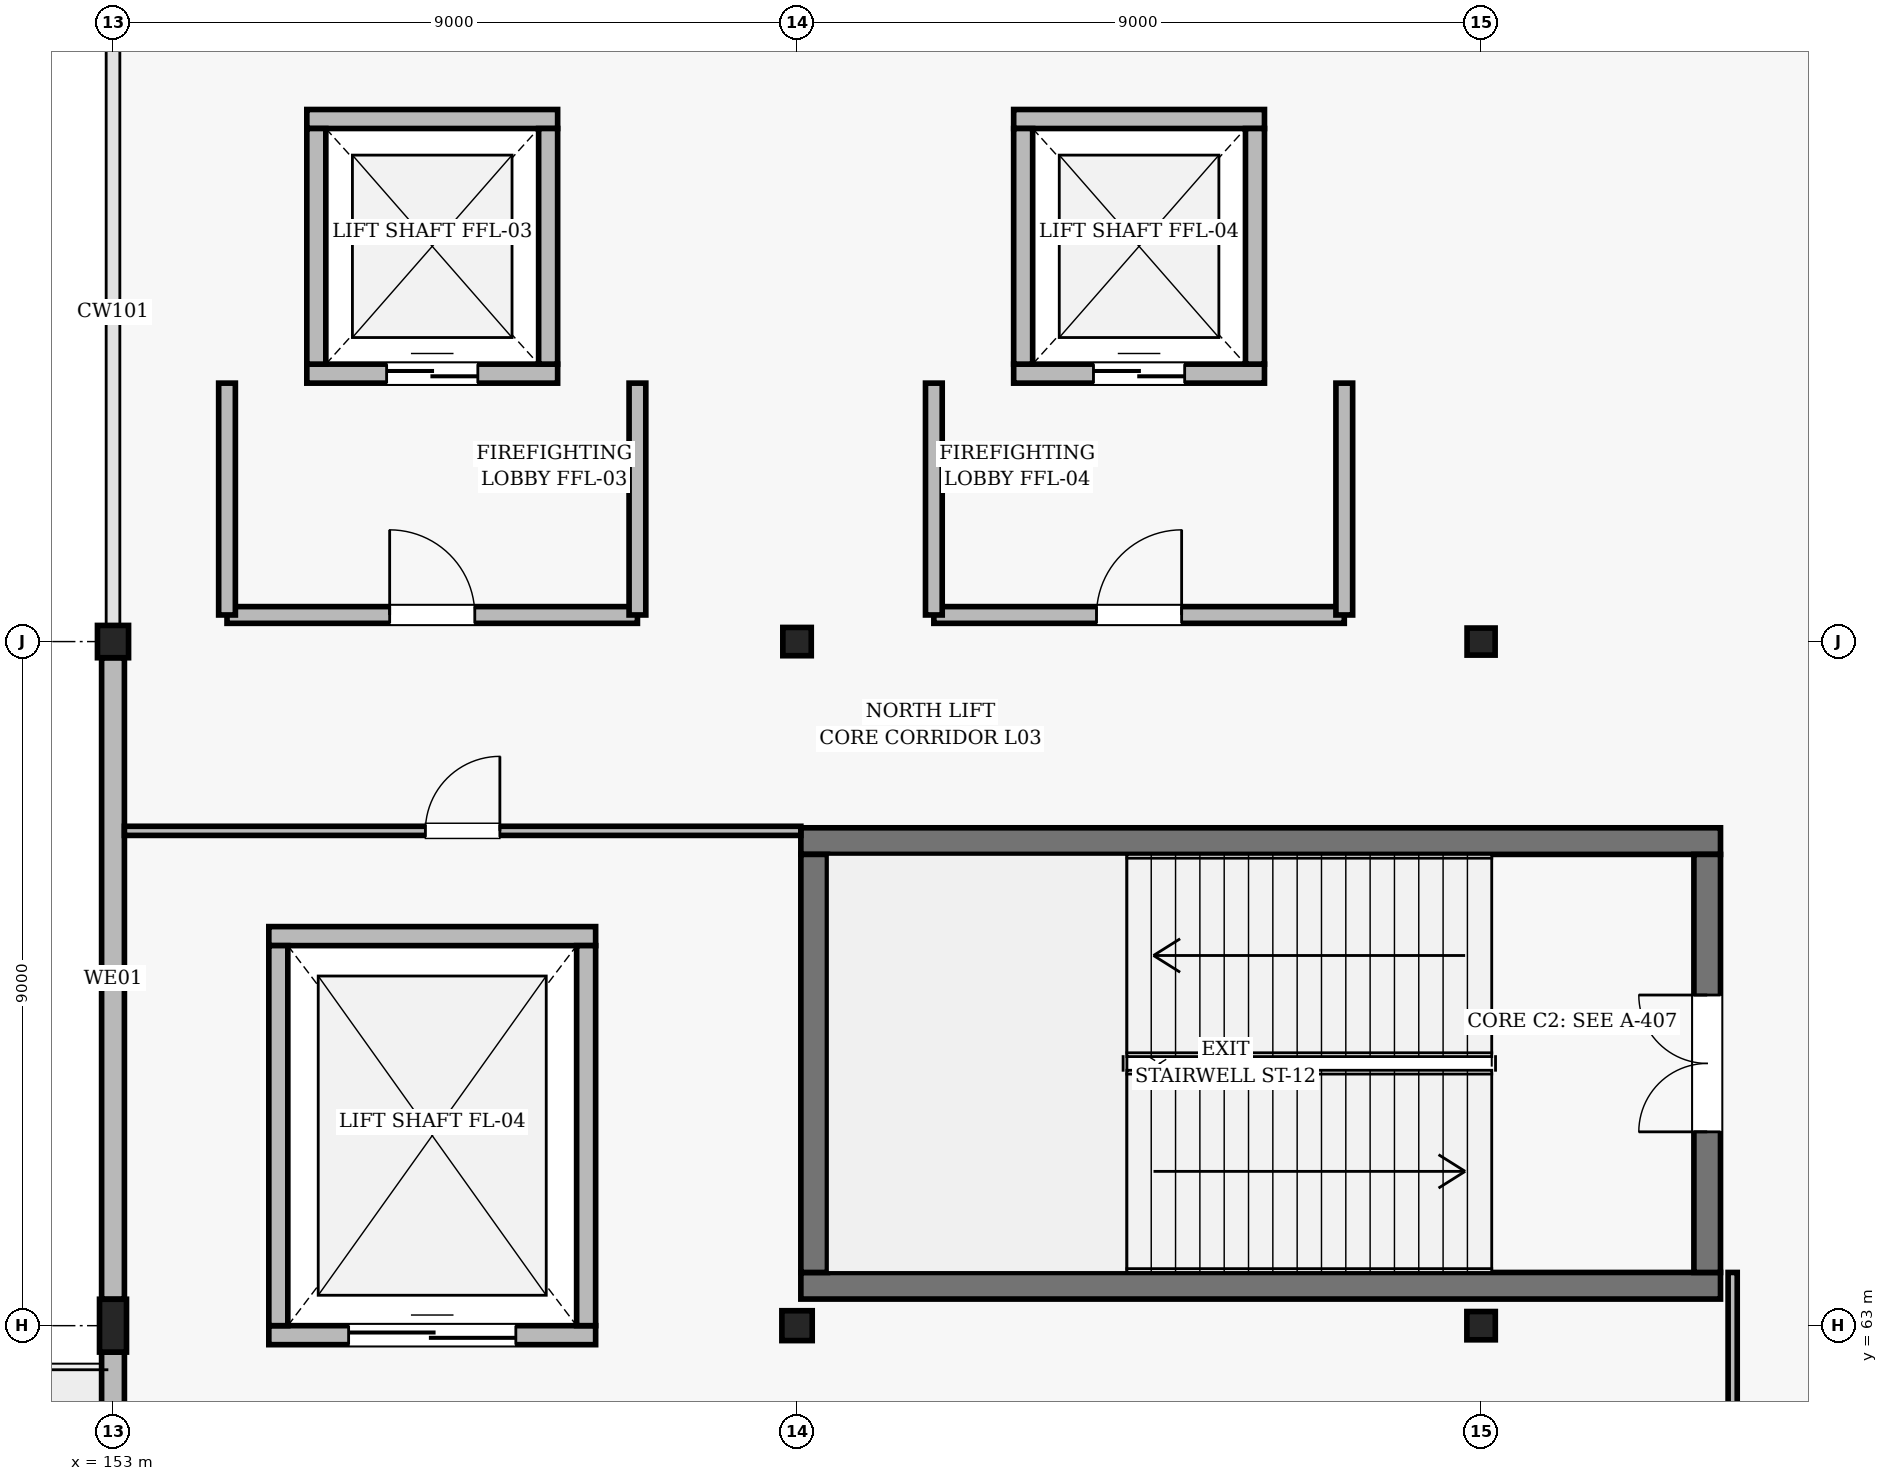
"""IFC4 building model, lengths in metres.
Left out: names, types, materials, properties, quantities, classifications, styles, units other than length and angle.
Written with IfcOpenShell. Run it as: python <this file> out.ifc"""

import sys

from ifc_helpers import new_model, si_unit, direction, frame, frame_2d, origin, origin_2d, place, context, subcontext, project, spatial, rectangle, i_section, extrude, element, fill, save


model = new_model("IFC4")
c1 = context("Model", 3, precision=1e-05, world=origin(), true_north=direction((0.0, 1.0)))
c2 = subcontext(c1, "Body", "Model", "MODEL_VIEW")
j1 = project(units=[si_unit("LENGTHUNIT", "METRE"), si_unit("PLANEANGLEUNIT", "RADIAN")], contexts=[c1])
p1 = place(None, origin())
s1 = spatial("IfcSite", under=j1, at=p1, CompositionType="ELEMENT")
p2 = place(p1, origin())
s2 = spatial("IfcBuilding", under=s1, at=p2, CompositionType="ELEMENT")
p3 = place(p2, frame((0.0, 0.0, 15.6)))
s3 = spatial("IfcBuildingStorey", under=s2, at=p3, CompositionType="ELEMENT", Elevation=15.6)
p4 = place(p3, frame((153.0, 63.0, 0.0), z_axis=(0.0, 0.0, 1.0), x_axis=(1.0, 0.0, 0.0)))
e1 = element("IfcColumn", 1, at=p4, inside=s3, PredefinedType="COLUMN", context=c2, shape_type="SweptSolid", body=[
    extrude(i_section(OverallWidth=0.355, OverallDepth=0.695, WebThickness=0.015, FlangeThickness=0.025, FilletRadius=0.018, at=origin_2d()), origin(), (0.0, 0.0, 1.0), 4.8),
])
p5 = place(p3, frame((153.0, 72.0, 0.0), z_axis=(0.0, 0.0, 1.0), x_axis=(1.0, 0.0, 0.0)))
e2 = element("IfcColumn", 2, at=p5, inside=s3, PredefinedType="COLUMN", context=c2, shape_type="SweptSolid", body=[
    extrude(i_section(OverallWidth=0.409, OverallDepth=0.425, WebThickness=0.031, FlangeThickness=0.049, FilletRadius=0.02, at=origin_2d()), origin(), (0.0, 0.0, 1.0), 4.8),
])
p6 = place(p3, frame((162.0, 63.0, 0.0), z_axis=(0.0, 0.0, 1.0), x_axis=(1.0, 0.0, 0.0)))
e3 = element("IfcColumn", 3, at=p6, inside=s3, PredefinedType="COLUMN", context=c2, shape_type="SweptSolid", body=[
    extrude(i_section(OverallWidth=0.399, OverallDepth=0.393, WebThickness=0.023, FlangeThickness=0.037, FilletRadius=0.018, at=origin_2d()), origin(), (0.0, 0.0, 1.0), 4.8),
])
for number, where, z_axis, x_axis in (
    (4, (162.0, 72.0, 0.0), (0.0, 0.0, 1.0), (1.0, 0.0, 0.0)),
    (5, (171.0, 63.0, 0.0), (0.0, 0.0, 1.0), (1.0, 0.0, 0.0)),
):
    element("IfcColumn", number, at=place(p3, frame(where, z_axis=z_axis, x_axis=x_axis)), inside=s3, PredefinedType="COLUMN", context=c2, shape_type="SweptSolid", body=[
        extrude(i_section(OverallWidth=0.374, OverallDepth=0.372, WebThickness=0.016, FlangeThickness=0.026, FilletRadius=0.016, at=origin_2d()), origin(), (0.0, 0.0, 1.0), 4.8),
    ])
p7 = place(p3, frame((171.0, 72.0, 0.0), z_axis=(0.0, 0.0, 1.0), x_axis=(1.0, 0.0, 0.0)))
e6 = element("IfcColumn", 6, at=p7, inside=s3, PredefinedType="COLUMN", context=c2, shape_type="SweptSolid", body=[
    extrude(i_section(OverallWidth=0.369, OverallDepth=0.356, WebThickness=0.011, FlangeThickness=0.018, FilletRadius=0.015, at=origin_2d()), origin(), (0.0, 0.0, 1.0), 4.8),
])
p8 = place(p3, frame((153.0, 54.2, 0.0), z_axis=(0.0, 0.0, 1.0), x_axis=(0.0, 1.0, 0.0)))
e7 = element("IfcWall", 7, at=p8, inside=s3, PredefinedType="SOLIDWALL", context=c2, shape_type="SweptSolid", body=[
    extrude(rectangle(XDim=8.453, YDim=0.3, at=frame_2d((4.226, 0.0))), origin(), (0.0, 0.0, 1.0), 3.89),
])
p9 = place(p3, frame((153.0, 63.347, 0.0), z_axis=(0.0, 0.0, 1.0), x_axis=(0.0, 1.0, 0.0)))
e8 = element("IfcWall", 8, at=p9, inside=s3, PredefinedType="SOLIDWALL", context=c2, shape_type="SweptSolid", body=[
    extrude(rectangle(XDim=8.44, YDim=0.3, at=frame_2d((4.22, 0.0))), origin(), (0.0, 0.0, 1.0), 3.901),
])
for number, where, z_axis, x_axis in (
    (9, (162.05, 63.525, 0.0), (0.0, 0.0, 1.0), (1.0, 0.0, 0.0)),
    (10, (174.15, 69.375, 0.0), (0.0, 0.0, 1.0), (-1.0, 0.0, 0.0)),
):
    element("IfcWall", number, at=place(p3, frame(where, z_axis=z_axis, x_axis=x_axis)), inside=s3, PredefinedType="SHEAR", context=c2, shape_type="SweptSolid", body=[
        extrude(rectangle(XDim=12.1, YDim=0.35, at=frame_2d((6.05, 0.0))), origin(), (0.0, 0.0, 1.0), 4.6),
    ])
p10 = place(p3, frame((162.225, 69.2, 0.0), z_axis=(0.0, 0.0, 1.0), x_axis=(0.0, -1.0, 0.0)))
e11 = element("IfcWall", 11, at=p10, inside=s3, PredefinedType="SHEAR", context=c2, shape_type="SweptSolid", body=[
    extrude(rectangle(XDim=5.5, YDim=0.35, at=frame_2d((2.75, 0.0))), origin(), (0.0, 0.0, 1.0), 4.6),
])
p11 = place(p3, frame((173.975, 63.7, 0.0), z_axis=(0.0, 0.0, 1.0), x_axis=(0.0, 1.0, 0.0)))
e12 = element("IfcWall", 12, at=p11, inside=s3, PredefinedType="SHEAR", context=c2, shape_type="SweptSolid", body=[
    extrude(rectangle(XDim=5.5, YDim=0.35, at=frame_2d((2.75, 0.0))), origin(), (0.0, 0.0, 1.0), 4.6),
])
p12 = place(p11, frame((1.85, 0.0, 0.0)))
e13 = element("IfcOpeningElement", 13, at=p12, cuts=e12, PredefinedType="OPENING", context=c2, shape_type="SweptSolid", body=[
    extrude(rectangle(XDim=1.8, YDim=2.2, at=frame_2d((0.9, 1.1))), frame((0.0, 0.185, 0.0), z_axis=(0.0, -1.0, 0.0), x_axis=(1.0, 0.0, 0.0)), (0.0, 0.0, 1.0), 0.37),
])
p13 = place(p3, frame((155.55, 75.525, 0.0), z_axis=(0.0, 0.0, 1.0), x_axis=(1.0, 0.0, 0.0)))
e14 = element("IfcWall", 14, at=p13, inside=s3, PredefinedType="SOLIDWALL", context=c2, shape_type="SweptSolid", body=[
    extrude(rectangle(XDim=3.3, YDim=0.25, at=frame_2d((1.65, 0.0))), origin(), (0.0, 0.0, 1.0), 4.6),
])
p14 = place(p13, frame((1.05, 0.0, 0.0)))
e15 = element("IfcOpeningElement", 15, at=p14, cuts=e14, PredefinedType="OPENING", context=c2, shape_type="SweptSolid", body=[
    extrude(rectangle(XDim=1.2, YDim=2.25, at=frame_2d((0.6, 1.125))), frame((0.0, 0.135, 0.0), z_axis=(0.0, -1.0, 0.0), x_axis=(1.0, 0.0, 0.0)), (0.0, 0.0, 1.0), 0.27),
])
p15 = place(p3, frame((158.85, 78.875, 0.0), z_axis=(0.0, 0.0, 1.0), x_axis=(-1.0, 0.0, 0.0)))
e16 = element("IfcWall", 16, at=p15, inside=s3, PredefinedType="SOLIDWALL", context=c2, shape_type="SweptSolid", body=[
    extrude(rectangle(XDim=3.3, YDim=0.25, at=frame_2d((1.65, 0.0))), origin(), (0.0, 0.0, 1.0), 4.6),
])
for number, where, z_axis, x_axis in (
    (17, (155.675, 78.75, 0.0), (0.0, 0.0, 1.0), (0.0, -1.0, 0.0)),
    (18, (158.725, 75.65, 0.0), (0.0, 0.0, 1.0), (0.0, 1.0, 0.0)),
):
    element("IfcWall", number, at=place(p3, frame(where, z_axis=z_axis, x_axis=x_axis)), inside=s3, PredefinedType="SOLIDWALL", context=c2, shape_type="SweptSolid", body=[
        extrude(rectangle(XDim=3.1, YDim=0.25, at=frame_2d((1.55, 0.0))), origin(), (0.0, 0.0, 1.0), 4.6),
    ])
p16 = place(p3, frame((154.5, 72.35, 0.0), z_axis=(0.0, 0.0, 1.0), x_axis=(1.0, 0.0, 0.0)))
e19 = element("IfcWall", 19, at=p16, inside=s3, PredefinedType="SOLIDWALL", context=c2, shape_type="SweptSolid", body=[
    extrude(rectangle(XDim=5.4, YDim=0.22, at=frame_2d((2.7, 0.0))), origin(), (0.0, 0.0, 1.0), 3.812),
])
p17 = place(p16, frame((2.14, 0.0, 0.0)))
e20 = element("IfcOpeningElement", 20, at=p17, cuts=e19, PredefinedType="OPENING", context=c2, shape_type="SweptSolid", body=[
    extrude(rectangle(XDim=1.12, YDim=2.2, at=frame_2d((0.56, 1.1))), frame((0.0, 0.12, 0.0), z_axis=(0.0, -1.0, 0.0), x_axis=(1.0, 0.0, 0.0)), (0.0, 0.0, 1.0), 0.24),
])
for number, where, z_axis, x_axis in (
    (21, (154.5, 72.35, 0.0), (0.0, 0.0, 1.0), (0.0, 1.0, 0.0)),
    (22, (159.9, 72.35, 0.0), (0.0, 0.0, 1.0), (0.0, 1.0, 0.0)),
):
    element("IfcWall", number, at=place(p3, frame(where, z_axis=z_axis, x_axis=x_axis)), inside=s3, PredefinedType="SOLIDWALL", context=c2, shape_type="SweptSolid", body=[
        extrude(rectangle(XDim=3.05, YDim=0.22, at=frame_2d((1.525, 0.0))), origin(), (0.0, 0.0, 1.0), 3.812),
    ])
p18 = place(p3, frame((164.85, 75.525, 0.0), z_axis=(0.0, 0.0, 1.0), x_axis=(1.0, 0.0, 0.0)))
e23 = element("IfcWall", 23, at=p18, inside=s3, PredefinedType="SOLIDWALL", context=c2, shape_type="SweptSolid", body=[
    extrude(rectangle(XDim=3.3, YDim=0.25, at=frame_2d((1.65, 0.0))), origin(), (0.0, 0.0, 1.0), 4.6),
])
p19 = place(p18, frame((1.05, 0.0, 0.0)))
e24 = element("IfcOpeningElement", 24, at=p19, cuts=e23, PredefinedType="OPENING", context=c2, shape_type="SweptSolid", body=[
    extrude(rectangle(XDim=1.2, YDim=2.25, at=frame_2d((0.6, 1.125))), frame((0.0, 0.135, 0.0), z_axis=(0.0, -1.0, 0.0), x_axis=(1.0, 0.0, 0.0)), (0.0, 0.0, 1.0), 0.27),
])
p20 = place(p3, frame((168.15, 78.875, 0.0), z_axis=(0.0, 0.0, 1.0), x_axis=(-1.0, 0.0, 0.0)))
e25 = element("IfcWall", 25, at=p20, inside=s3, PredefinedType="SOLIDWALL", context=c2, shape_type="SweptSolid", body=[
    extrude(rectangle(XDim=3.3, YDim=0.25, at=frame_2d((1.65, 0.0))), origin(), (0.0, 0.0, 1.0), 4.6),
])
for number, where, z_axis, x_axis in (
    (26, (164.975, 78.75, 0.0), (0.0, 0.0, 1.0), (0.0, -1.0, 0.0)),
    (27, (168.025, 75.65, 0.0), (0.0, 0.0, 1.0), (0.0, 1.0, 0.0)),
):
    element("IfcWall", number, at=place(p3, frame(where, z_axis=z_axis, x_axis=x_axis)), inside=s3, PredefinedType="SOLIDWALL", context=c2, shape_type="SweptSolid", body=[
        extrude(rectangle(XDim=3.1, YDim=0.25, at=frame_2d((1.55, 0.0))), origin(), (0.0, 0.0, 1.0), 4.6),
    ])
p21 = place(p3, frame((163.8, 72.35, 0.0), z_axis=(0.0, 0.0, 1.0), x_axis=(1.0, 0.0, 0.0)))
e28 = element("IfcWall", 28, at=p21, inside=s3, PredefinedType="SOLIDWALL", context=c2, shape_type="SweptSolid", body=[
    extrude(rectangle(XDim=5.4, YDim=0.22, at=frame_2d((2.7, 0.0))), origin(), (0.0, 0.0, 1.0), 3.89),
])
p22 = place(p21, frame((2.14, 0.0, 0.0)))
e29 = element("IfcOpeningElement", 29, at=p22, cuts=e28, PredefinedType="OPENING", context=c2, shape_type="SweptSolid", body=[
    extrude(rectangle(XDim=1.12, YDim=2.2, at=frame_2d((0.56, 1.1))), frame((0.0, 0.12, 0.0), z_axis=(0.0, -1.0, 0.0), x_axis=(1.0, 0.0, 0.0)), (0.0, 0.0, 1.0), 0.24),
])
for number, where, z_axis, x_axis in (
    (30, (163.8, 72.35, 0.0), (0.0, 0.0, 1.0), (0.0, 1.0, 0.0)),
    (31, (169.2, 72.35, 0.0), (0.0, 0.0, 1.0), (0.0, 1.0, 0.0)),
):
    element("IfcWall", number, at=place(p3, frame(where, z_axis=z_axis, x_axis=x_axis)), inside=s3, PredefinedType="SOLIDWALL", context=c2, shape_type="SweptSolid", body=[
        extrude(rectangle(XDim=3.05, YDim=0.22, at=frame_2d((1.525, 0.0))), origin(), (0.0, 0.0, 1.0), 3.89),
    ])
p23 = place(p3, frame((155.05, 62.875, 0.0), z_axis=(0.0, 0.0, 1.0), x_axis=(1.0, 0.0, 0.0)))
e32 = element("IfcWall", 32, at=p23, inside=s3, PredefinedType="SOLIDWALL", context=c2, shape_type="SweptSolid", body=[
    extrude(rectangle(XDim=4.3, YDim=0.25, at=frame_2d((2.15, 0.0))), origin(), (0.0, 0.0, 1.0), 4.6),
])
p24 = place(p23, frame((1.05, 0.0, 0.0)))
e33 = element("IfcOpeningElement", 33, at=p24, cuts=e32, PredefinedType="OPENING", context=c2, shape_type="SweptSolid", body=[
    extrude(rectangle(XDim=2.2, YDim=2.5, at=frame_2d((1.1, 1.25))), frame((0.0, 0.135, 0.0), z_axis=(0.0, -1.0, 0.0), x_axis=(1.0, 0.0, 0.0)), (0.0, 0.0, 1.0), 0.27),
])
p25 = place(p3, frame((159.35, 68.125, 0.0), z_axis=(0.0, 0.0, 1.0), x_axis=(-1.0, 0.0, 0.0)))
e34 = element("IfcWall", 34, at=p25, inside=s3, PredefinedType="SOLIDWALL", context=c2, shape_type="SweptSolid", body=[
    extrude(rectangle(XDim=4.3, YDim=0.25, at=frame_2d((2.15, 0.0))), origin(), (0.0, 0.0, 1.0), 4.6),
])
for number, where, z_axis, x_axis in (
    (35, (155.175, 68.0, 0.0), (0.0, 0.0, 1.0), (0.0, -1.0, 0.0)),
    (36, (159.225, 63.0, 0.0), (0.0, 0.0, 1.0), (0.0, 1.0, 0.0)),
):
    element("IfcWall", number, at=place(p3, frame(where, z_axis=z_axis, x_axis=x_axis)), inside=s3, PredefinedType="SOLIDWALL", context=c2, shape_type="SweptSolid", body=[
        extrude(rectangle(XDim=5.0, YDim=0.25, at=frame_2d((2.5, 0.0))), origin(), (0.0, 0.0, 1.0), 4.6),
    ])
p26 = place(p3, frame((153.15, 69.51, 0.0), z_axis=(0.0, 0.0, 1.0), x_axis=(1.0, 0.0, 0.0)))
e37 = element("IfcWall", 37, at=p26, inside=s3, PredefinedType="PARTITIONING", context=c2, shape_type="SweptSolid", body=[
    extrude(rectangle(XDim=8.9, YDim=0.12, at=frame_2d((4.45, 0.0))), origin(), (0.0, 0.0, 1.0), 3.89),
])
p27 = place(p26, frame((3.96, 0.0, 0.0)))
e38 = element("IfcOpeningElement", 38, at=p27, cuts=e37, PredefinedType="OPENING", context=c2, shape_type="SweptSolid", body=[
    extrude(rectangle(XDim=0.98, YDim=2.15, at=frame_2d((0.49, 1.075))), frame((0.0, 0.07, 0.0), z_axis=(0.0, -1.0, 0.0), x_axis=(1.0, 0.0, 0.0)), (0.0, 0.0, 1.0), 0.14),
])
p28 = place(p3, frame((174.31, 63.7, 0.0), z_axis=(0.0, 0.0, 1.0), x_axis=(0.0, -1.0, 0.0)))
e39 = element("IfcWall", 39, at=p28, inside=s3, PredefinedType="PARTITIONING", context=c2, shape_type="SweptSolid", body=[
    extrude(rectangle(XDim=2.5, YDim=0.12, at=frame_2d((1.25, 0.0))), origin(), (0.0, 0.0, 1.0), 3.89),
])
p29 = place(p12, origin())
e40 = element("IfcDoor", 40, at=p29, inside=s3, OperationType="DOUBLE_DOOR_SINGLE_SWING", PredefinedType="DOOR", context=c2, shape_type="SweptSolid", body=[
    extrude(rectangle(XDim=1.8, YDim=2.2, at=frame_2d((0.9, 1.1))), frame((0.0, 0.025, 0.0), z_axis=(0.0, -1.0, 0.0), x_axis=(1.0, 0.0, 0.0)), (0.0, 0.0, 1.0), 0.05),
])
fill(e13, e40)
p30 = place(p14, origin())
e41 = element("IfcDoor", 41, at=p30, inside=s3, OperationType="DOUBLE_DOOR_SLIDING", PredefinedType="DOOR", context=c2, shape_type="SweptSolid", body=[
    extrude(rectangle(XDim=1.2, YDim=2.25, at=frame_2d((0.6, 1.125))), frame((0.0, 0.025, 0.0), z_axis=(0.0, -1.0, 0.0), x_axis=(1.0, 0.0, 0.0)), (0.0, 0.0, 1.0), 0.05),
])
fill(e15, e41)
p31 = place(p17, origin())
e42 = element("IfcDoor", 42, at=p31, inside=s3, OperationType="SINGLE_SWING_LEFT", PredefinedType="DOOR", context=c2, shape_type="SweptSolid", body=[
    extrude(rectangle(XDim=1.12, YDim=2.2, at=frame_2d((0.56, 1.1))), frame((0.0, 0.025, 0.0), z_axis=(0.0, -1.0, 0.0), x_axis=(1.0, 0.0, 0.0)), (0.0, 0.0, 1.0), 0.05),
])
fill(e20, e42)
p32 = place(p19, origin())
e43 = element("IfcDoor", 43, at=p32, inside=s3, OperationType="DOUBLE_DOOR_SLIDING", PredefinedType="DOOR", context=c2, shape_type="SweptSolid", body=[
    extrude(rectangle(XDim=1.2, YDim=2.25, at=frame_2d((0.6, 1.125))), frame((0.0, 0.025, 0.0), z_axis=(0.0, -1.0, 0.0), x_axis=(1.0, 0.0, 0.0)), (0.0, 0.0, 1.0), 0.05),
])
fill(e24, e43)
p33 = place(p22, origin())
e44 = element("IfcDoor", 44, at=p33, inside=s3, OperationType="SINGLE_SWING_RIGHT", PredefinedType="DOOR", context=c2, shape_type="SweptSolid", body=[
    extrude(rectangle(XDim=1.12, YDim=2.2, at=frame_2d((0.56, 1.1))), frame((0.0, 0.025, 0.0), z_axis=(0.0, -1.0, 0.0), x_axis=(1.0, 0.0, 0.0)), (0.0, 0.0, 1.0), 0.05),
])
fill(e29, e44)
p34 = place(p24, origin())
e45 = element("IfcDoor", 45, at=p34, inside=s3, OperationType="DOUBLE_DOOR_SLIDING", PredefinedType="DOOR", context=c2, shape_type="SweptSolid", body=[
    extrude(rectangle(XDim=2.2, YDim=2.5, at=frame_2d((1.1, 1.25))), frame((0.0, 0.025, 0.0), z_axis=(0.0, -1.0, 0.0), x_axis=(1.0, 0.0, 0.0)), (0.0, 0.0, 1.0), 0.05),
])
fill(e33, e45)
p35 = place(p27, origin())
e46 = element("IfcDoor", 46, at=p35, inside=s3, OperationType="SINGLE_SWING_RIGHT", PredefinedType="DOOR", context=c2, shape_type="SweptSolid", body=[
    extrude(rectangle(XDim=0.98, YDim=2.15, at=frame_2d((0.49, 1.075))), frame((0.0, 0.025, 0.0), z_axis=(0.0, -1.0, 0.0), x_axis=(1.0, 0.0, 0.0)), (0.0, 0.0, 1.0), 0.05),
])
fill(e38, e46)
save(model, sys.argv[1])
